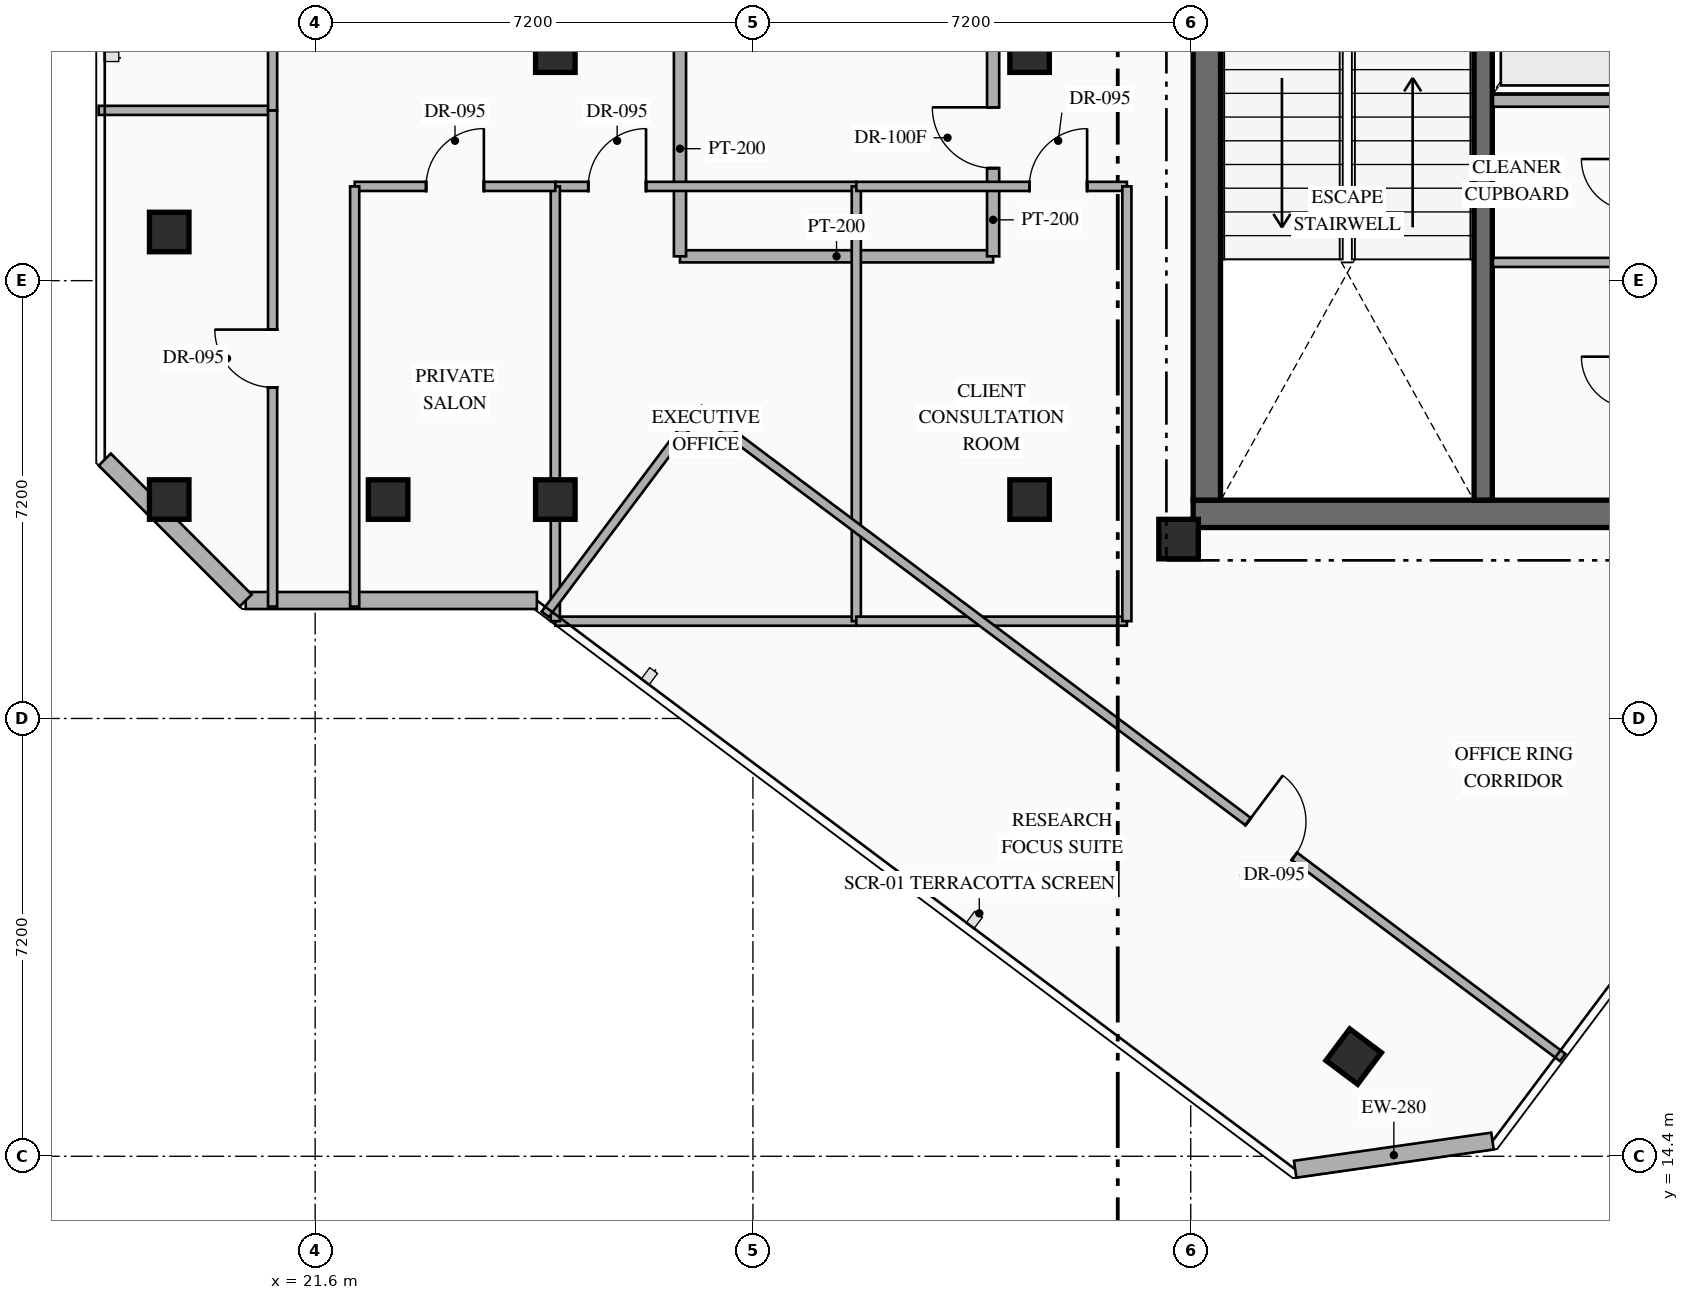
"""IFC4 building model, lengths in metres.
Left out: names, types, materials, properties, quantities, classifications, styles, units other than length and angle.
Written with IfcOpenShell. Run it as: python <this file> out.ifc"""

import sys

from ifc_helpers import new_model, si_unit, direction, frame, frame_2d, origin, origin_2d, place, context, subcontext, project, spatial, rectangle, hollow_rectangle, extrude, element, fill, save


model = new_model("IFC4")
c1 = context("Model", 3, precision=1e-05, world=origin(), true_north=direction((0.0, 1.0)))
c2 = subcontext(c1, "Body", "Model", "MODEL_VIEW")
j1 = project(units=[si_unit("LENGTHUNIT", "METRE"), si_unit("PLANEANGLEUNIT", "RADIAN")], contexts=[c1])
p1 = place(None, origin())
s1 = spatial("IfcSite", under=j1, at=p1, CompositionType="ELEMENT")
p2 = place(p1, origin())
s2 = spatial("IfcBuilding", under=s1, at=p2, CompositionType="ELEMENT")
p3 = place(p2, frame((0.0, 0.0, 243.15)))
s3 = spatial("IfcBuildingStorey", under=s2, at=p3, CompositionType="ELEMENT", Elevation=243.15)
p4 = place(p3, frame((36.04, 24.965, 0.0), z_axis=(0.0, 0.0, 1.0), x_axis=(1.0, 0.0, 0.0)))
e1 = element("IfcWall", 1, at=p4, inside=s3, PredefinedType="SHEAR", context=c2, shape_type="SweptSolid", body=[
    extrude(rectangle(XDim=7.46, YDim=0.45, at=frame_2d((3.73, 0.0))), origin(), (0.0, 0.0, 1.0), 3.6),
])
p5 = place(p3, frame((36.265, 25.19, 0.0), z_axis=(0.0, 0.0, 1.0), x_axis=(0.0, 1.0, 0.0)))
e2 = element("IfcWall", 2, at=p5, inside=s3, PredefinedType="SHEAR", context=c2, shape_type="SweptSolid", body=[
    extrude(rectangle(XDim=9.48, YDim=0.45, at=frame_2d((4.74, 0.0))), origin(), (0.0, 0.0, 1.0), 3.6),
])
p6 = place(p3, frame((40.81, 25.19, 0.0), z_axis=(0.0, 0.0, 1.0), x_axis=(0.0, 1.0, 0.0)))
e3 = element("IfcWall", 3, at=p6, inside=s3, PredefinedType="SHEAR", context=c2, shape_type="SweptSolid", body=[
    extrude(rectangle(XDim=9.48, YDim=0.3, at=frame_2d((4.74, 0.0))), origin(), (0.0, 0.0, 1.0), 3.6),
])
for number, where, z_axis, x_axis in (
    (4, (25.55, 32.55, 0.0), (0.0, 0.0, 1.0), (1.0, 0.0, 0.0)),
    (5, (33.35, 32.55, 0.0), (0.0, 0.0, 1.0), (1.0, 0.0, 0.0)),
    (6, (35.8, 24.55, 0.0), (0.0, 0.0, 1.0), (1.0, 0.0, 0.0)),
    (7, (25.55, 25.2, 0.0), (0.0, 0.0, 1.0), (1.0, 0.0, 0.0)),
    (8, (33.35, 25.2, 0.0), (0.0, 0.0, 1.0), (1.0, 0.0, 0.0)),
    (9, (19.2, 25.2, 0.0), (0.0, 0.0, 1.0), (1.0, 0.0, 0.0)),
    (10, (19.2, 29.6, 0.0), (0.0, 0.0, 1.0), (1.0, 0.0, 0.0)),
    (11, (22.8, 25.2, 0.0), (0.0, 0.0, 1.0), (1.0, 0.0, 0.0)),
    (12, (38.68, 16.04, 0.0), (0.0, 0.0, 1.0), (0.8, -0.6, 0.0)),
):
    element("IfcColumn", number, at=place(p3, frame(where, z_axis=z_axis, x_axis=x_axis)), inside=s3, PredefinedType="COLUMN", context=c2, shape_type="SweptSolid", body=[
        extrude(hollow_rectangle(XDim=0.65, YDim=0.65, WallThickness=0.025, at=origin_2d()), origin(), (0.0, 0.0, 1.0), 3.6),
    ])
p7 = place(p3, frame((40.963, 14.65, 0.0), z_axis=(0.0, 0.0, 1.0), x_axis=(-0.989977778067, -0.141223223777, 0.0)))
e13 = element("IfcWall", 13, at=p7, inside=s3, PredefinedType="STANDARD", context=c2, shape_type="SweptSolid", body=[
    extrude(rectangle(XDim=3.278, YDim=0.28, at=frame_2d((1.639, 0.0))), origin(), (0.0, 0.0, 1.0), 3.35),
])
p8 = place(p3, frame((25.247, 23.54, 0.0), z_axis=(0.0, 0.0, 1.0), x_axis=(-1.0, 0.0, 0.0)))
e14 = element("IfcWall", 14, at=p8, inside=s3, PredefinedType="STANDARD", context=c2, shape_type="SweptSolid", body=[
    extrude(rectangle(XDim=4.789, YDim=0.28, at=frame_2d((2.395, 0.0))), origin(), (0.0, 0.0, 1.0), 3.35),
])
p9 = place(p3, frame((20.458, 23.54, 0.0), z_axis=(0.0, 0.0, 1.0), x_axis=(-0.707144017911, 0.707069542501, 0.0)))
e15 = element("IfcWall", 15, at=p9, inside=s3, PredefinedType="STANDARD", context=c2, shape_type="SweptSolid", body=[
    extrude(rectangle(XDim=3.278, YDim=0.28, at=frame_2d((1.639, 0.0))), origin(), (0.0, 0.0, 1.0), 3.35),
])
p10 = place(p3, frame((40.97, 31.76, 0.0), z_axis=(0.0, 0.0, 1.0), x_axis=(1.0, 0.0, 0.0)))
e16 = element("IfcWall", 16, at=p10, inside=s3, PredefinedType="STANDARD", context=c2, shape_type="SweptSolid", body=[
    extrude(rectangle(XDim=2.08, YDim=0.2, at=frame_2d((1.04, 0.0))), origin(), (0.0, 0.0, 1.0), 3.35),
])
p11 = place(p3, frame((40.97, 29.1, 0.0), z_axis=(0.0, 0.0, 1.0), x_axis=(1.0, 0.0, 0.0)))
e17 = element("IfcWall", 17, at=p11, inside=s3, PredefinedType="PARTITIONING", context=c2, shape_type="SweptSolid", body=[
    extrude(rectangle(XDim=2.08, YDim=0.15, at=frame_2d((1.04, 0.0))), origin(), (0.0, 0.0, 1.0), 3.35),
])
p12 = place(p3, frame((27.6, 29.2, 0.0), z_axis=(0.0, 0.0, 1.0), x_axis=(1.0, 0.0, 0.0)))
e18 = element("IfcWall", 18, at=p12, inside=s3, PredefinedType="STANDARD", context=c2, shape_type="SweptSolid", body=[
    extrude(rectangle(XDim=5.15, YDim=0.2, at=frame_2d((2.575, 0.0))), origin(), (0.0, 0.0, 1.0), 3.35),
])
p13 = place(p3, frame((27.6, 29.2, 0.0), z_axis=(0.0, 0.0, 1.0), x_axis=(0.0, 1.0, 0.0)))
e19 = element("IfcWall", 19, at=p13, inside=s3, PredefinedType="STANDARD", context=c2, shape_type="SweptSolid", body=[
    extrude(rectangle(XDim=3.54, YDim=0.2, at=frame_2d((1.77, 0.0))), origin(), (0.0, 0.0, 1.0), 3.35),
])
p14 = place(p3, frame((32.75, 29.2, 0.0), z_axis=(0.0, 0.0, 1.0), x_axis=(0.0, 1.0, 0.0)))
e20 = element("IfcWall", 20, at=p14, inside=s3, PredefinedType="STANDARD", context=c2, shape_type="SweptSolid", body=[
    extrude(rectangle(XDim=3.54, YDim=0.2, at=frame_2d((1.77, 0.0))), origin(), (0.0, 0.0, 1.0), 3.35),
])
p15 = place(p14, frame((1.45, 0.0, 0.0)))
e21 = element("IfcOpeningElement", 21, at=p15, cuts=e20, PredefinedType="OPENING", context=c2, shape_type="SweptSolid", body=[
    extrude(rectangle(XDim=1.0, YDim=2.2, at=frame_2d((0.5, 1.1))), frame((0.0, 0.11, 0.0), z_axis=(0.0, -1.0, 0.0), x_axis=(1.0, 0.0, 0.0)), (0.0, 0.0, 1.0), 0.22),
])
p16 = place(p3, frame((25.55, 23.2, 0.0), z_axis=(0.0, 0.0, 1.0), x_axis=(1.0, 0.0, 0.0)))
e22 = element("IfcWall", 22, at=p16, inside=s3, PredefinedType="PARTITIONING", context=c2, shape_type="SweptSolid", body=[
    extrude(rectangle(XDim=4.95, YDim=0.15, at=frame_2d((2.475, 0.0))), origin(), (0.0, 0.0, 1.0), 3.35),
])
p17 = place(p3, frame((25.55, 30.35, 0.0), z_axis=(0.0, 0.0, 1.0), x_axis=(1.0, 0.0, 0.0)))
e23 = element("IfcWall", 23, at=p17, inside=s3, PredefinedType="PARTITIONING", context=c2, shape_type="SweptSolid", body=[
    extrude(rectangle(XDim=4.95, YDim=0.15, at=frame_2d((2.475, 0.0))), origin(), (0.0, 0.0, 1.0), 3.35),
])
p18 = place(p17, frame((0.542, 0.0, 0.0)))
e24 = element("IfcOpeningElement", 24, at=p18, cuts=e23, PredefinedType="OPENING", context=c2, shape_type="SweptSolid", body=[
    extrude(rectangle(XDim=0.95, YDim=2.15, at=frame_2d((0.475, 1.075))), frame((0.0, 0.085, 0.0), z_axis=(0.0, -1.0, 0.0), x_axis=(1.0, 0.0, 0.0)), (0.0, 0.0, 1.0), 0.17),
])
p19 = place(p3, frame((25.55, 23.2, 0.0), z_axis=(0.0, 0.0, 1.0), x_axis=(0.0, 1.0, 0.0)))
e25 = element("IfcWall", 25, at=p19, inside=s3, PredefinedType="PARTITIONING", context=c2, shape_type="SweptSolid", body=[
    extrude(rectangle(XDim=7.15, YDim=0.15, at=frame_2d((3.575, 0.0))), origin(), (0.0, 0.0, 1.0), 2.757),
])
p20 = place(p3, frame((30.5, 23.2, 0.0), z_axis=(0.0, 0.0, 1.0), x_axis=(0.0, 1.0, 0.0)))
e26 = element("IfcWall", 26, at=p20, inside=s3, PredefinedType="PARTITIONING", context=c2, shape_type="SweptSolid", body=[
    extrude(rectangle(XDim=7.15, YDim=0.15, at=frame_2d((3.575, 0.0))), origin(), (0.0, 0.0, 1.0), 3.35),
])
p21 = place(p3, frame((30.5, 23.2, 0.0), z_axis=(0.0, 0.0, 1.0), x_axis=(1.0, 0.0, 0.0)))
e27 = element("IfcWall", 27, at=p21, inside=s3, PredefinedType="PARTITIONING", context=c2, shape_type="SweptSolid", body=[
    extrude(rectangle(XDim=4.45, YDim=0.15, at=frame_2d((2.225, 0.0))), origin(), (0.0, 0.0, 1.0), 3.35),
])
p22 = place(p3, frame((30.5, 30.35, 0.0), z_axis=(0.0, 0.0, 1.0), x_axis=(1.0, 0.0, 0.0)))
e28 = element("IfcWall", 28, at=p22, inside=s3, PredefinedType="PARTITIONING", context=c2, shape_type="SweptSolid", body=[
    extrude(rectangle(XDim=4.45, YDim=0.15, at=frame_2d((2.225, 0.0))), origin(), (0.0, 0.0, 1.0), 3.35),
])
p23 = place(p22, frame((2.846, 0.0, 0.0)))
e29 = element("IfcOpeningElement", 29, at=p23, cuts=e28, PredefinedType="OPENING", context=c2, shape_type="SweptSolid", body=[
    extrude(rectangle(XDim=0.95, YDim=2.15, at=frame_2d((0.475, 1.075))), frame((0.0, 0.085, 0.0), z_axis=(0.0, -1.0, 0.0), x_axis=(1.0, 0.0, 0.0)), (0.0, 0.0, 1.0), 0.17),
])
p24 = place(p3, frame((34.95, 23.2, 0.0), z_axis=(0.0, 0.0, 1.0), x_axis=(0.0, 1.0, 0.0)))
e30 = element("IfcWall", 30, at=p24, inside=s3, PredefinedType="PARTITIONING", context=c2, shape_type="SweptSolid", body=[
    extrude(rectangle(XDim=7.15, YDim=0.15, at=frame_2d((3.575, 0.0))), origin(), (0.0, 0.0, 1.0), 3.35),
])
p25 = place(p3, frame((18.04, 31.6, 0.0), z_axis=(0.0, 0.0, 1.0), x_axis=(1.0, 0.0, 0.0)))
e31 = element("IfcWall", 31, at=p25, inside=s3, PredefinedType="PARTITIONING", context=c2, shape_type="SweptSolid", body=[
    extrude(rectangle(XDim=2.86, YDim=0.15, at=frame_2d((1.43, 0.0))), origin(), (0.0, 0.0, 1.0), 3.35),
])
p26 = place(p3, frame((20.9, 23.44, 0.0), z_axis=(0.0, 0.0, 1.0), x_axis=(0.0, 1.0, 0.0)))
e32 = element("IfcWall", 32, at=p26, inside=s3, PredefinedType="PARTITIONING", context=c2, shape_type="SweptSolid", body=[
    extrude(rectangle(XDim=8.16, YDim=0.15, at=frame_2d((4.08, 0.0))), origin(), (0.0, 0.0, 1.0), 3.35),
])
p27 = place(p26, frame((3.605, 0.0, 0.0)))
e33 = element("IfcOpeningElement", 33, at=p27, cuts=e32, PredefinedType="OPENING", context=c2, shape_type="SweptSolid", body=[
    extrude(rectangle(XDim=0.95, YDim=2.15, at=frame_2d((0.475, 1.075))), frame((0.0, 0.085, 0.0), z_axis=(0.0, -1.0, 0.0), x_axis=(1.0, 0.0, 0.0)), (0.0, 0.0, 1.0), 0.17),
])
p28 = place(p3, frame((20.9, 31.6, 0.0), z_axis=(0.0, 0.0, 1.0), x_axis=(0.0, 1.0, 0.0)))
e34 = element("IfcWall", 34, at=p28, inside=s3, PredefinedType="PARTITIONING", context=c2, shape_type="SweptSolid", body=[
    extrude(rectangle(XDim=10.2, YDim=0.15, at=frame_2d((5.1, 0.0))), origin(), (0.0, 0.0, 1.0), 3.35),
])
p29 = place(p28, frame((8.87, 0.0, 0.0)))
e35 = element("IfcOpeningElement", 35, at=p29, cuts=e34, PredefinedType="OPENING", context=c2, shape_type="SweptSolid", body=[
    extrude(rectangle(XDim=0.95, YDim=2.15, at=frame_2d((0.475, 1.075))), frame((0.0, 0.085, 0.0), z_axis=(0.0, -1.0, 0.0), x_axis=(1.0, 0.0, 0.0)), (0.0, 0.0, 1.0), 0.17),
])
p30 = place(p3, frame((22.25, 30.35, 0.0), z_axis=(0.0, 0.0, 1.0), x_axis=(1.0, 0.0, 0.0)))
e36 = element("IfcWall", 36, at=p30, inside=s3, PredefinedType="PARTITIONING", context=c2, shape_type="SweptSolid", body=[
    extrude(rectangle(XDim=3.3, YDim=0.15, at=frame_2d((1.65, 0.0))), origin(), (0.0, 0.0, 1.0), 3.35),
])
p31 = place(p30, frame((1.175, 0.0, 0.0)))
e37 = element("IfcOpeningElement", 37, at=p31, cuts=e36, PredefinedType="OPENING", context=c2, shape_type="SweptSolid", body=[
    extrude(rectangle(XDim=0.95, YDim=2.15, at=frame_2d((0.475, 1.075))), frame((0.0, 0.085, 0.0), z_axis=(0.0, -1.0, 0.0), x_axis=(1.0, 0.0, 0.0)), (0.0, 0.0, 1.0), 0.17),
])
p32 = place(p3, frame((22.25, 23.44, 0.0), z_axis=(0.0, 0.0, 1.0), x_axis=(0.0, 1.0, 0.0)))
e38 = element("IfcWall", 38, at=p32, inside=s3, PredefinedType="PARTITIONING", context=c2, shape_type="SweptSolid", body=[
    extrude(rectangle(XDim=6.91, YDim=0.15, at=frame_2d((3.455, 0.0))), origin(), (0.0, 0.0, 1.0), 3.35),
])
p33 = place(p3, frame((27.91, 26.68, 0.0), z_axis=(0.0, 0.0, 1.0), x_axis=(0.8, -0.6, 0.0)))
e39 = element("IfcWall", 39, at=p33, inside=s3, PredefinedType="PARTITIONING", context=c2, shape_type="SweptSolid", body=[
    extrude(rectangle(XDim=17.76, YDim=0.15, at=frame_2d((8.88, 0.0))), origin(), (0.0, 0.0, 1.0), 3.35),
])
p34 = place(p33, frame((11.294, 0.0, 0.0)))
e40 = element("IfcOpeningElement", 40, at=p34, cuts=e39, PredefinedType="OPENING", context=c2, shape_type="SweptSolid", body=[
    extrude(rectangle(XDim=0.95, YDim=2.15, at=frame_2d((0.475, 1.075))), frame((0.0, 0.085, 0.0), z_axis=(0.0, -1.0, 0.0), x_axis=(1.0, 0.0, 0.0)), (0.0, 0.0, 1.0), 0.17),
])
p35 = place(p3, frame((25.384, 23.312, 0.0), z_axis=(0.0, 0.0, 1.0), x_axis=(0.599990721155, 0.80000695905, 0.0)))
e41 = element("IfcWall", 41, at=p35, inside=s3, PredefinedType="PARTITIONING", context=c2, shape_type="SweptSolid", body=[
    extrude(rectangle(XDim=4.21, YDim=0.15, at=frame_2d((2.105, 0.0))), origin(), (0.0, 0.0, 1.0), 3.35),
])
p36 = place(p15, origin())
e42 = element("IfcDoor", 42, at=p36, inside=s3, OperationType="SINGLE_SWING_RIGHT", PredefinedType="DOOR", context=c2, shape_type="SweptSolid", body=[
    extrude(rectangle(XDim=1.0, YDim=2.2, at=frame_2d((0.5, 1.1))), frame((0.0, 0.025, 0.0), z_axis=(0.0, -1.0, 0.0), x_axis=(1.0, 0.0, 0.0)), (0.0, 0.0, 1.0), 0.05),
])
fill(e21, e42)
p37 = place(p18, origin())
e43 = element("IfcDoor", 43, at=p37, inside=s3, OperationType="SINGLE_SWING_RIGHT", PredefinedType="DOOR", context=c2, shape_type="SweptSolid", body=[
    extrude(rectangle(XDim=0.95, YDim=2.15, at=frame_2d((0.475, 1.075))), frame((0.0, 0.025, 0.0), z_axis=(0.0, -1.0, 0.0), x_axis=(1.0, 0.0, 0.0)), (0.0, 0.0, 1.0), 0.05),
])
fill(e24, e43)
p38 = place(p23, origin())
e44 = element("IfcDoor", 44, at=p38, inside=s3, OperationType="SINGLE_SWING_RIGHT", PredefinedType="DOOR", context=c2, shape_type="SweptSolid", body=[
    extrude(rectangle(XDim=0.95, YDim=2.15, at=frame_2d((0.475, 1.075))), frame((0.0, 0.025, 0.0), z_axis=(0.0, -1.0, 0.0), x_axis=(1.0, 0.0, 0.0)), (0.0, 0.0, 1.0), 0.05),
])
fill(e29, e44)
p39 = place(p27, origin())
e45 = element("IfcDoor", 45, at=p39, inside=s3, OperationType="SINGLE_SWING_RIGHT", PredefinedType="DOOR", context=c2, shape_type="SweptSolid", body=[
    extrude(rectangle(XDim=0.95, YDim=2.15, at=frame_2d((0.475, 1.075))), frame((0.0, 0.025, 0.0), z_axis=(0.0, -1.0, 0.0), x_axis=(1.0, 0.0, 0.0)), (0.0, 0.0, 1.0), 0.05),
])
fill(e33, e45)
p40 = place(p31, origin())
e46 = element("IfcDoor", 46, at=p40, inside=s3, OperationType="SINGLE_SWING_RIGHT", PredefinedType="DOOR", context=c2, shape_type="SweptSolid", body=[
    extrude(rectangle(XDim=0.95, YDim=2.15, at=frame_2d((0.475, 1.075))), frame((0.0, 0.025, 0.0), z_axis=(0.0, -1.0, 0.0), x_axis=(1.0, 0.0, 0.0)), (0.0, 0.0, 1.0), 0.05),
])
fill(e37, e46)
p41 = place(p34, origin())
e47 = element("IfcDoor", 47, at=p41, inside=s3, OperationType="SINGLE_SWING_LEFT", PredefinedType="DOOR", context=c2, shape_type="SweptSolid", body=[
    extrude(rectangle(XDim=0.95, YDim=2.15, at=frame_2d((0.475, 1.075))), frame((0.0, 0.025, 0.0), z_axis=(0.0, -1.0, 0.0), x_axis=(1.0, 0.0, 0.0)), (0.0, 0.0, 1.0), 0.05),
])
fill(e40, e47)
save(model, sys.argv[1])
